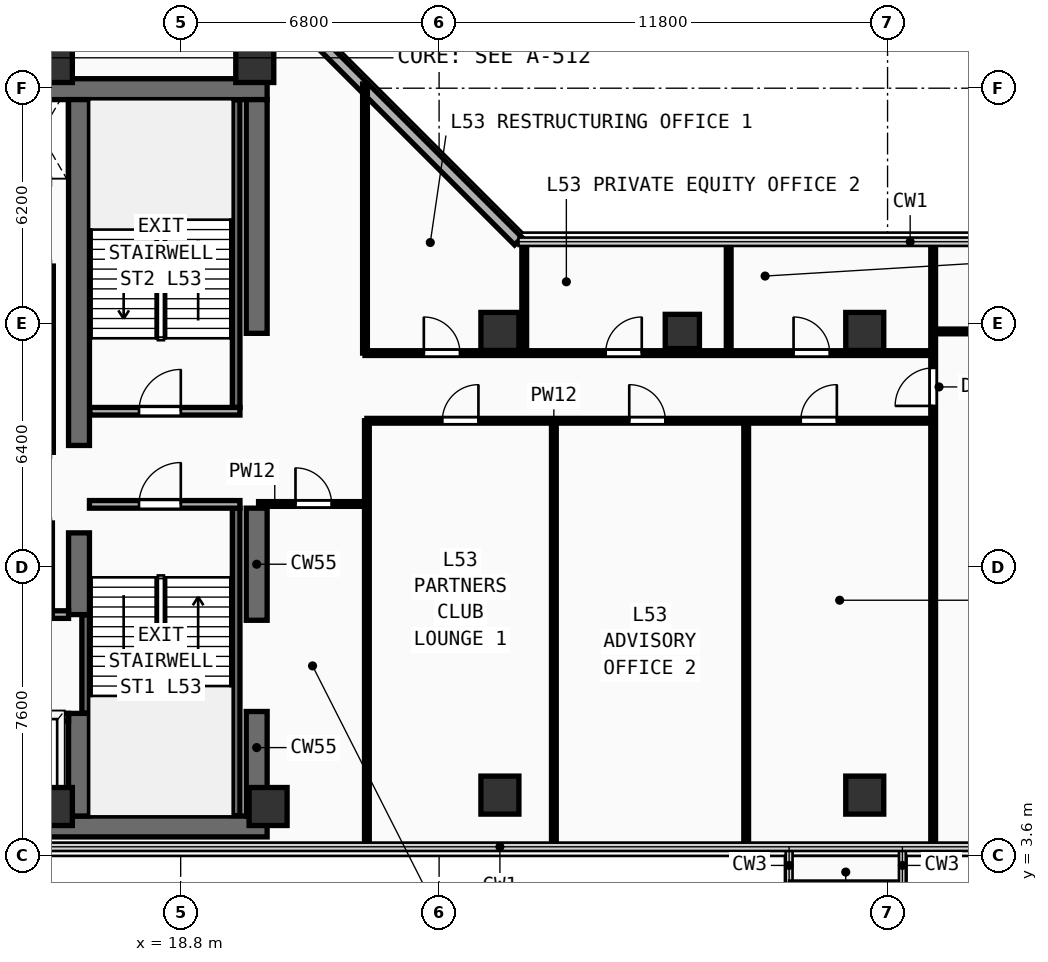
"""IFC4 building model, lengths in metres.
Left out: names, types, materials, properties, quantities, classifications, styles, units other than length and angle.
Written with IfcOpenShell. Run it as: python <this file> out.ifc"""

import sys

from ifc_helpers import new_model, si_unit, direction, frame, frame_2d, origin, origin_2d, place, context, subcontext, project, spatial, rectangle, extrude, element, fill, save


model = new_model("IFC4")
c1 = context("Model", 3, precision=1e-05, world=origin(), true_north=direction((0.0, 1.0)))
c2 = subcontext(c1, "Body", "Model", "MODEL_VIEW")
j1 = project(units=[si_unit("LENGTHUNIT", "METRE"), si_unit("PLANEANGLEUNIT", "RADIAN")], contexts=[c1])
p1 = place(None, origin())
s1 = spatial("IfcSite", under=j1, at=p1, CompositionType="ELEMENT")
p2 = place(p1, origin())
s2 = spatial("IfcBuilding", under=s1, at=p2, CompositionType="ELEMENT")
p3 = place(p2, frame((0.0, 0.0, 208.3)))
s3 = spatial("IfcBuildingStorey", under=s2, at=p3, CompositionType="ELEMENT", Elevation=208.3)
for number, where, z_axis, x_axis in (
    (1, (7.175, 4.375, 0.0), (0.0, 0.0, 1.0), (1.0, 0.0, 0.0)),
    (2, (7.175, 23.775, 0.0), (0.0, 0.0, 1.0), (1.0, 0.0, 0.0)),
):
    element("IfcWall", number, at=place(p3, frame(where, z_axis=z_axis, x_axis=x_axis)), inside=s3, PredefinedType="SHEAR", context=c2, shape_type="SweptSolid", body=[
        extrude(rectangle(XDim=13.9, YDim=0.55, at=frame_2d((6.95, 0.0))), origin(), (0.0, 0.0, 1.0), 3.56),
    ])
p4 = place(p3, frame((20.8, 4.65, 0.0), z_axis=(0.0, 0.0, 1.0), x_axis=(0.0, 1.0, 0.0)))
e3 = element("IfcWall", 3, at=p4, inside=s3, PredefinedType="SHEAR", context=c2, shape_type="SweptSolid", body=[
    extrude(rectangle(XDim=2.75, YDim=0.55, at=frame_2d((1.375, 0.0))), origin(), (0.0, 0.0, 1.0), 3.56),
])
p5 = place(p3, frame((20.8, 9.8, 0.0), z_axis=(0.0, 0.0, 1.0), x_axis=(0.0, 1.0, 0.0)))
e4 = element("IfcWall", 4, at=p5, inside=s3, PredefinedType="SHEAR", context=c2, shape_type="SweptSolid", body=[
    extrude(rectangle(XDim=2.95, YDim=0.55, at=frame_2d((1.475, 0.0))), origin(), (0.0, 0.0, 1.0), 3.56),
])
p6 = place(p3, frame((20.8, 17.35, 0.0), z_axis=(0.0, 0.0, 1.0), x_axis=(0.0, 1.0, 0.0)))
e5 = element("IfcWall", 5, at=p6, inside=s3, PredefinedType="SHEAR", context=c2, shape_type="SweptSolid", body=[
    extrude(rectangle(XDim=6.15, YDim=0.55, at=frame_2d((3.075, 0.0))), origin(), (0.0, 0.0, 1.0), 3.56),
])
p7 = place(p3, frame((16.125, 4.65, 0.0), z_axis=(0.0, 0.0, 1.0), x_axis=(0.0, 1.0, 0.0)))
e6 = element("IfcWall", 6, at=p7, inside=s3, PredefinedType="SHEAR", context=c2, shape_type="SweptSolid", body=[
    extrude(rectangle(XDim=2.7, YDim=0.55, at=frame_2d((1.35, 0.0))), origin(), (0.0, 0.0, 1.0), 3.56),
])
p8 = place(p3, frame((16.125, 9.95, 0.0), z_axis=(0.0, 0.0, 1.0), x_axis=(0.0, 1.0, 0.0)))
e7 = element("IfcWall", 7, at=p8, inside=s3, PredefinedType="SHEAR", context=c2, shape_type="SweptSolid", body=[
    extrude(rectangle(XDim=2.15, YDim=0.55, at=frame_2d((1.075, 0.0))), origin(), (0.0, 0.0, 1.0), 3.56),
])
p9 = place(p3, frame((16.125, 14.4, 0.0), z_axis=(0.0, 0.0, 1.0), x_axis=(0.0, 1.0, 0.0)))
e8 = element("IfcWall", 8, at=p9, inside=s3, PredefinedType="SHEAR", context=c2, shape_type="SweptSolid", body=[
    extrude(rectangle(XDim=9.1, YDim=0.55, at=frame_2d((4.55, 0.0))), origin(), (0.0, 0.0, 1.0), 3.56),
])
for number, where, z_axis, x_axis in (
    (9, (15.45, 4.9, 0.0), (0.0, 0.0, 1.0), (1.0, 0.0, 0.0)),
    (10, (21.1, 4.9, 0.0), (0.0, 0.0, 1.0), (1.0, 0.0, 0.0)),
    (11, (15.45, 24.45, 0.0), (0.0, 0.0, 1.0), (1.0, 0.0, 0.0)),
    (12, (20.75, 24.45, 0.0), (0.0, 0.0, 1.0), (1.0, 0.0, 0.0)),
    (13, (27.2, 5.2, 0.0), (0.0, 0.0, 1.0), (1.0, 0.0, 0.0)),
    (14, (36.8, 5.2, 0.0), (0.0, 0.0, 1.0), (1.0, 0.0, 0.0)),
    (15, (27.2, 17.4, 0.0), (0.0, 0.0, 1.0), (1.0, 0.0, 0.0)),
    (16, (36.8, 17.4, 0.0), (0.0, 0.0, 1.0), (1.0, 0.0, 0.0)),
):
    element("IfcColumn", number, at=place(p3, frame(where, z_axis=z_axis, x_axis=x_axis)), inside=s3, PredefinedType="COLUMN", context=c2, shape_type="SweptSolid", body=[
        extrude(rectangle(XDim=1.0, YDim=1.0, at=origin_2d()), origin(), (0.0, 0.0, 1.0), 3.56),
    ])
p10 = place(p3, frame((32.0, 17.4, 0.0), z_axis=(0.0, 0.0, 1.0), x_axis=(1.0, 0.0, 0.0)))
e17 = element("IfcColumn", 17, at=p10, inside=s3, PredefinedType="COLUMN", context=c2, shape_type="SweptSolid", body=[
    extrude(rectangle(XDim=0.9, YDim=0.9, at=origin_2d()), origin(), (0.0, 0.0, 1.0), 3.56),
])
p11 = place(p3, frame((27.685, 19.775, 0.0), z_axis=(0.0, 0.0, 1.0), x_axis=(-0.707106781187, 0.707106781187, 0.0)))
e18 = element("IfcWall", 18, at=p11, inside=s3, PredefinedType="SOLIDWALL", context=c2, shape_type="SweptSolid", body=[
    extrude(rectangle(XDim=9.207, YDim=0.28, at=frame_2d((4.603, 0.0))), origin(), (0.0, 0.0, 1.0), 3.56),
])
p12 = place(p3, frame((16.3, 7.36, 0.0), z_axis=(0.0, 0.0, 1.0), x_axis=(0.0, 1.0, 0.0)))
e19 = element("IfcWall", 19, at=p12, inside=s3, PredefinedType="SHEAR", context=c2, shape_type="SweptSolid", body=[
    extrude(rectangle(XDim=2.58, YDim=0.2, at=frame_2d((1.29, 0.0))), origin(), (0.0, 0.0, 1.0), 3.56),
])
p13 = place(p3, frame((20.26, 4.66, 0.0), z_axis=(0.0, 0.0, 1.0), x_axis=(0.0, 1.0, 0.0)))
e20 = element("IfcWall", 20, at=p13, inside=s3, PredefinedType="SHEAR", context=c2, shape_type="SweptSolid", body=[
    extrude(rectangle(XDim=8.09, YDim=0.2, at=frame_2d((4.045, 0.0))), origin(), (0.0, 0.0, 1.0), 3.56),
])
p14 = place(p3, frame((16.4, 12.85, 0.0), z_axis=(0.0, 0.0, 1.0), x_axis=(1.0, 0.0, 0.0)))
e21 = element("IfcWall", 21, at=p14, inside=s3, PredefinedType="PARTITIONING", context=c2, shape_type="SweptSolid", body=[
    extrude(rectangle(XDim=3.96, YDim=0.2, at=frame_2d((1.98, 0.0))), origin(), (0.0, 0.0, 1.0), 3.56),
])
p15 = place(p14, frame((1.304, 0.0, 0.0)))
e22 = element("IfcOpeningElement", 22, at=p15, cuts=e21, PredefinedType="OPENING", context=c2, shape_type="SweptSolid", body=[
    extrude(rectangle(XDim=1.1, YDim=2.2, at=frame_2d((0.55, 1.1))), frame((0.0, 0.11, 0.0), z_axis=(0.0, -1.0, 0.0), x_axis=(1.0, 0.0, 0.0)), (0.0, 0.0, 1.0), 0.22),
])
p16 = place(p3, frame((20.26, 15.4, 0.0), z_axis=(0.0, 0.0, 1.0), x_axis=(0.0, 1.0, 0.0)))
e23 = element("IfcWall", 23, at=p16, inside=s3, PredefinedType="SHEAR", context=c2, shape_type="SweptSolid", body=[
    extrude(rectangle(XDim=8.09, YDim=0.2, at=frame_2d((4.045, 0.0))), origin(), (0.0, 0.0, 1.0), 3.56),
])
p17 = place(p3, frame((16.41, 15.3, 0.0), z_axis=(0.0, 0.0, 1.0), x_axis=(1.0, 0.0, 0.0)))
e24 = element("IfcWall", 24, at=p17, inside=s3, PredefinedType="PARTITIONING", context=c2, shape_type="SweptSolid", body=[
    extrude(rectangle(XDim=3.95, YDim=0.2, at=frame_2d((1.975, 0.0))), origin(), (0.0, 0.0, 1.0), 3.56),
])
p18 = place(p17, frame((1.294, 0.0, 0.0)))
e25 = element("IfcOpeningElement", 25, at=p18, cuts=e24, PredefinedType="OPENING", context=c2, shape_type="SweptSolid", body=[
    extrude(rectangle(XDim=1.1, YDim=2.2, at=frame_2d((0.55, 1.1))), frame((0.0, 0.11, 0.0), z_axis=(0.0, -1.0, 0.0), x_axis=(1.0, 0.0, 0.0)), (0.0, 0.0, 1.0), 0.22),
])
p19 = place(p3, frame((7.5, 7.25, 0.0), z_axis=(0.0, 0.0, 1.0), x_axis=(1.0, 0.0, 0.0)))
e26 = element("IfcWall", 26, at=p19, inside=s3, PredefinedType="PARTITIONING", context=c2, shape_type="SweptSolid", body=[
    extrude(rectangle(XDim=8.35, YDim=0.2, at=frame_2d((4.175, 0.0))), origin(), (0.0, 0.0, 1.0), 3.56),
])
p20 = place(p19, frame((0.53, 0.0, 0.0)))
e27 = element("IfcOpeningElement", 27, at=p20, cuts=e26, PredefinedType="OPENING", context=c2, shape_type="SweptSolid", body=[
    extrude(rectangle(XDim=1.1, YDim=2.2, at=frame_2d((0.55, 1.1))), frame((0.0, 0.11, 0.0), z_axis=(0.0, -1.0, 0.0), x_axis=(1.0, 0.0, 0.0)), (0.0, 0.0, 1.0), 0.22),
])
p21 = place(p19, frame((2.37, 0.0, 0.0)))
e28 = element("IfcOpeningElement", 28, at=p21, cuts=e26, PredefinedType="OPENING", context=c2, shape_type="SweptSolid", body=[
    extrude(rectangle(XDim=1.1, YDim=2.2, at=frame_2d((0.55, 1.1))), frame((0.0, 0.11, 0.0), z_axis=(0.0, -1.0, 0.0), x_axis=(1.0, 0.0, 0.0)), (0.0, 0.0, 1.0), 0.22),
])
p22 = place(p19, frame((4.33, 0.0, 0.0)))
e29 = element("IfcOpeningElement", 29, at=p22, cuts=e26, PredefinedType="OPENING", context=c2, shape_type="SweptSolid", body=[
    extrude(rectangle(XDim=1.1, YDim=2.2, at=frame_2d((0.55, 1.1))), frame((0.0, 0.11, 0.0), z_axis=(0.0, -1.0, 0.0), x_axis=(1.0, 0.0, 0.0)), (0.0, 0.0, 1.0), 0.22),
])
p23 = place(p19, frame((6.5, 0.0, 0.0)))
e30 = element("IfcOpeningElement", 30, at=p23, cuts=e26, PredefinedType="OPENING", context=c2, shape_type="SweptSolid", body=[
    extrude(rectangle(XDim=1.1, YDim=2.2, at=frame_2d((0.55, 1.1))), frame((0.0, 0.11, 0.0), z_axis=(0.0, -1.0, 0.0), x_axis=(1.0, 0.0, 0.0)), (0.0, 0.0, 1.0), 0.22),
])
p24 = place(p3, frame((7.5, 9.95, 0.0), z_axis=(0.0, 0.0, 1.0), x_axis=(1.0, 0.0, 0.0)))
e31 = element("IfcWall", 31, at=p24, inside=s3, PredefinedType="PARTITIONING", context=c2, shape_type="SweptSolid", body=[
    extrude(rectangle(XDim=8.35, YDim=0.2, at=frame_2d((4.175, 0.0))), origin(), (0.0, 0.0, 1.0), 3.56),
])
p25 = place(p3, frame((15.35, 9.95, 0.0), z_axis=(0.0, 0.0, 1.0), x_axis=(0.0, 1.0, 0.0)))
e32 = element("IfcWall", 32, at=p25, inside=s3, PredefinedType="PARTITIONING", context=c2, shape_type="SweptSolid", body=[
    extrude(rectangle(XDim=2.41, YDim=0.15, at=frame_2d((1.205, 0.0))), origin(), (0.0, 0.0, 1.0), 3.56),
])
p26 = place(p3, frame((15.35, 14.22, 0.0), z_axis=(0.0, 0.0, 1.0), x_axis=(0.0, 1.0, 0.0)))
e33 = element("IfcWall", 33, at=p26, inside=s3, PredefinedType="PARTITIONING", context=c2, shape_type="SweptSolid", body=[
    extrude(rectangle(XDim=2.23, YDim=0.2, at=frame_2d((1.115, 0.0))), origin(), (0.0, 0.0, 1.0), 3.56),
])
p27 = place(p3, frame((15.35, 16.45, 0.0), z_axis=(0.0, 0.0, 1.0), x_axis=(0.0, 1.0, 0.0)))
e34 = element("IfcWall", 34, at=p27, inside=s3, PredefinedType="PARTITIONING", context=c2, shape_type="SweptSolid", body=[
    extrude(rectangle(XDim=2.67, YDim=0.2, at=frame_2d((1.335, 0.0))), origin(), (0.0, 0.0, 1.0), 3.56),
])
p28 = place(p3, frame((20.85, 12.86, 0.0), z_axis=(0.0, 0.0, 1.0), x_axis=(1.0, 0.0, 0.0)))
e35 = element("IfcWall", 35, at=p28, inside=s3, PredefinedType="PARTITIONING", context=c2, shape_type="SweptSolid", body=[
    extrude(rectangle(XDim=2.85, YDim=0.125, at=frame_2d((1.425, 0.0))), origin(), (0.0, 0.0, 1.0), 3.56),
])
p29 = place(p28, frame((0.971, 0.0, 0.0)))
e36 = element("IfcOpeningElement", 36, at=p29, cuts=e35, PredefinedType="OPENING", context=c2, shape_type="SweptSolid", body=[
    extrude(rectangle(XDim=0.95, YDim=2.15, at=frame_2d((0.475, 1.075))), frame((0.0, 0.073, 0.0), z_axis=(0.0, -1.0, 0.0), x_axis=(1.0, 0.0, 0.0)), (0.0, 0.0, 1.0), 0.145),
])
p30 = place(p3, frame((23.7, 3.84, 0.0), z_axis=(0.0, 0.0, 1.0), x_axis=(0.0, 1.0, 0.0)))
e37 = element("IfcWall", 37, at=p30, inside=s3, PredefinedType="PARTITIONING", context=c2, shape_type="SweptSolid", body=[
    extrude(rectangle(XDim=11.21, YDim=0.125, at=frame_2d((5.605, 0.0))), origin(), (0.0, 0.0, 1.0), 3.56),
])
p31 = place(p3, frame((23.7, 15.05, 0.0), z_axis=(0.0, 0.0, 1.0), x_axis=(1.0, 0.0, 0.0)))
e38 = element("IfcWall", 38, at=p31, inside=s3, PredefinedType="PARTITIONING", context=c2, shape_type="SweptSolid", body=[
    extrude(rectangle(XDim=14.9, YDim=0.125, at=frame_2d((7.45, 0.0))), origin(), (0.0, 0.0, 1.0), 3.56),
])
p32 = place(p31, frame((1.985, 0.0, 0.0)))
e39 = element("IfcOpeningElement", 39, at=p32, cuts=e38, PredefinedType="OPENING", context=c2, shape_type="SweptSolid", body=[
    extrude(rectangle(XDim=0.95, YDim=2.15, at=frame_2d((0.475, 1.075))), frame((0.0, 0.073, 0.0), z_axis=(0.0, -1.0, 0.0), x_axis=(1.0, 0.0, 0.0)), (0.0, 0.0, 1.0), 0.145),
])
p33 = place(p31, frame((6.903, 0.0, 0.0)))
e40 = element("IfcOpeningElement", 40, at=p33, cuts=e38, PredefinedType="OPENING", context=c2, shape_type="SweptSolid", body=[
    extrude(rectangle(XDim=0.95, YDim=2.15, at=frame_2d((0.475, 1.075))), frame((0.0, 0.073, 0.0), z_axis=(0.0, -1.0, 0.0), x_axis=(1.0, 0.0, 0.0)), (0.0, 0.0, 1.0), 0.145),
])
p34 = place(p31, frame((11.416, 0.0, 0.0)))
e41 = element("IfcOpeningElement", 41, at=p34, cuts=e38, PredefinedType="OPENING", context=c2, shape_type="SweptSolid", body=[
    extrude(rectangle(XDim=0.95, YDim=2.15, at=frame_2d((0.475, 1.075))), frame((0.0, 0.073, 0.0), z_axis=(0.0, -1.0, 0.0), x_axis=(1.0, 0.0, 0.0)), (0.0, 0.0, 1.0), 0.145),
])
for number, where, z_axis, x_axis in (
    (42, (28.62, 3.84, 0.0), (0.0, 0.0, 1.0), (0.0, 1.0, 0.0)),
    (43, (33.68, 3.84, 0.0), (0.0, 0.0, 1.0), (0.0, 1.0, 0.0)),
):
    element("IfcWall", number, at=place(p3, frame(where, z_axis=z_axis, x_axis=x_axis)), inside=s3, PredefinedType="PARTITIONING", context=c2, shape_type="SweptSolid", body=[
        extrude(rectangle(XDim=11.21, YDim=0.125, at=frame_2d((5.605, 0.0))), origin(), (0.0, 0.0, 1.0), 3.56),
    ])
p35 = place(p3, frame((38.6, 3.84, 0.0), z_axis=(0.0, 0.0, 1.0), x_axis=(0.0, 1.0, 0.0)))
e44 = element("IfcWall", 44, at=p35, inside=s3, PredefinedType="PARTITIONING", context=c2, shape_type="SweptSolid", body=[
    extrude(rectangle(XDim=15.92, YDim=0.125, at=frame_2d((7.96, 0.0))), origin(), (0.0, 0.0, 1.0), 3.56),
])
p36 = place(p35, frame((11.6, 0.0, 0.0)))
e45 = element("IfcOpeningElement", 45, at=p36, cuts=e44, PredefinedType="OPENING", context=c2, shape_type="SweptSolid", body=[
    extrude(rectangle(XDim=1.0, YDim=2.2, at=frame_2d((0.5, 1.1))), frame((0.0, 0.073, 0.0), z_axis=(0.0, -1.0, 0.0), x_axis=(1.0, 0.0, 0.0)), (0.0, 0.0, 1.0), 0.145),
])
p37 = place(p3, frame((38.6, 17.4, 0.0), z_axis=(0.0, 0.0, 1.0), x_axis=(1.0, 0.0, 0.0)))
e46 = element("IfcWall", 46, at=p37, inside=s3, PredefinedType="PARTITIONING", context=c2, shape_type="SweptSolid", body=[
    extrude(rectangle(XDim=12.56, YDim=0.125, at=frame_2d((6.28, 0.0))), origin(), (0.0, 0.0, 1.0), 3.26),
])
p38 = place(p37, frame((3.525, 0.0, 0.0)))
e47 = element("IfcOpeningElement", 47, at=p38, cuts=e46, PredefinedType="OPENING", context=c2, shape_type="SweptSolid", body=[
    extrude(rectangle(XDim=0.95, YDim=2.15, at=frame_2d((0.475, 1.075))), frame((0.0, 0.073, 0.0), z_axis=(0.0, -1.0, 0.0), x_axis=(1.0, 0.0, 0.0)), (0.0, 0.0, 1.0), 0.145),
])
p39 = place(p3, frame((23.65, 16.83, 0.0), z_axis=(0.0, 0.0, 1.0), x_axis=(0.0, 1.0, 0.0)))
e48 = element("IfcWall", 48, at=p39, inside=s3, PredefinedType="PARTITIONING", context=c2, shape_type="SweptSolid", body=[
    extrude(rectangle(XDim=7.08, YDim=0.125, at=frame_2d((3.54, 0.0))), origin(), (0.0, 0.0, 1.0), 3.56),
])
p40 = place(p3, frame((23.65, 16.83, 0.0), z_axis=(0.0, 0.0, 1.0), x_axis=(1.0, 0.0, 0.0)))
e49 = element("IfcWall", 49, at=p40, inside=s3, PredefinedType="PARTITIONING", context=c2, shape_type="SweptSolid", body=[
    extrude(rectangle(XDim=14.95, YDim=0.125, at=frame_2d((7.475, 0.0))), origin(), (0.0, 0.0, 1.0), 3.56),
])
p41 = place(p40, frame((1.548, 0.0, 0.0)))
e50 = element("IfcOpeningElement", 50, at=p41, cuts=e49, PredefinedType="OPENING", context=c2, shape_type="SweptSolid", body=[
    extrude(rectangle(XDim=0.95, YDim=2.15, at=frame_2d((0.475, 1.075))), frame((0.0, 0.073, 0.0), z_axis=(0.0, -1.0, 0.0), x_axis=(1.0, 0.0, 0.0)), (0.0, 0.0, 1.0), 0.145),
])
p42 = place(p40, frame((6.333, 0.0, 0.0)))
e51 = element("IfcOpeningElement", 51, at=p42, cuts=e49, PredefinedType="OPENING", context=c2, shape_type="SweptSolid", body=[
    extrude(rectangle(XDim=0.95, YDim=2.15, at=frame_2d((0.475, 1.075))), frame((0.0, 0.073, 0.0), z_axis=(0.0, -1.0, 0.0), x_axis=(1.0, 0.0, 0.0)), (0.0, 0.0, 1.0), 0.145),
])
p43 = place(p40, frame((11.277, 0.0, 0.0)))
e52 = element("IfcOpeningElement", 52, at=p43, cuts=e49, PredefinedType="OPENING", context=c2, shape_type="SweptSolid", body=[
    extrude(rectangle(XDim=0.95, YDim=2.15, at=frame_2d((0.475, 1.075))), frame((0.0, 0.073, 0.0), z_axis=(0.0, -1.0, 0.0), x_axis=(1.0, 0.0, 0.0)), (0.0, 0.0, 1.0), 0.145),
])
for number, where, z_axis, x_axis in (
    (53, (27.84, 16.83, 0.0), (0.0, 0.0, 1.0), (0.0, 1.0, 0.0)),
    (54, (33.22, 16.83, 0.0), (0.0, 0.0, 1.0), (0.0, 1.0, 0.0)),
):
    element("IfcWall", number, at=place(p3, frame(where, z_axis=z_axis, x_axis=x_axis)), inside=s3, PredefinedType="PARTITIONING", context=c2, shape_type="SweptSolid", body=[
        extrude(rectangle(XDim=2.93, YDim=0.125, at=frame_2d((1.465, 0.0))), origin(), (0.0, 0.0, 1.0), 3.56),
    ])
p44 = place(p15, frame((1.1, 0.0, 0.0), z_axis=(0.0, 0.0, 1.0), x_axis=(-1.0, 0.0, 0.0)))
e55 = element("IfcDoor", 55, at=p44, inside=s3, OperationType="SINGLE_SWING_LEFT", PredefinedType="DOOR", context=c2, shape_type="SweptSolid", body=[
    extrude(rectangle(XDim=1.1, YDim=2.2, at=frame_2d((0.55, 1.1))), frame((0.0, 0.025, 0.0), z_axis=(0.0, -1.0, 0.0), x_axis=(1.0, 0.0, 0.0)), (0.0, 0.0, 1.0), 0.05),
])
fill(e22, e55)
p45 = place(p18, origin())
e56 = element("IfcDoor", 56, at=p45, inside=s3, OperationType="SINGLE_SWING_RIGHT", PredefinedType="DOOR", context=c2, shape_type="SweptSolid", body=[
    extrude(rectangle(XDim=1.1, YDim=2.2, at=frame_2d((0.55, 1.1))), frame((0.0, 0.025, 0.0), z_axis=(0.0, -1.0, 0.0), x_axis=(1.0, 0.0, 0.0)), (0.0, 0.0, 1.0), 0.05),
])
fill(e25, e56)
p46 = place(p29, origin())
e57 = element("IfcDoor", 57, at=p46, inside=s3, OperationType="SINGLE_SWING_LEFT", PredefinedType="DOOR", context=c2, shape_type="SweptSolid", body=[
    extrude(rectangle(XDim=0.95, YDim=2.15, at=frame_2d((0.475, 1.075))), frame((0.0, 0.025, 0.0), z_axis=(0.0, -1.0, 0.0), x_axis=(1.0, 0.0, 0.0)), (0.0, 0.0, 1.0), 0.05),
])
fill(e36, e57)
p47 = place(p32, origin())
e58 = element("IfcDoor", 58, at=p47, inside=s3, OperationType="SINGLE_SWING_RIGHT", PredefinedType="DOOR", context=c2, shape_type="SweptSolid", body=[
    extrude(rectangle(XDim=0.95, YDim=2.15, at=frame_2d((0.475, 1.075))), frame((0.0, 0.025, 0.0), z_axis=(0.0, -1.0, 0.0), x_axis=(1.0, 0.0, 0.0)), (0.0, 0.0, 1.0), 0.05),
])
fill(e39, e58)
p48 = place(p33, origin())
e59 = element("IfcDoor", 59, at=p48, inside=s3, OperationType="SINGLE_SWING_LEFT", PredefinedType="DOOR", context=c2, shape_type="SweptSolid", body=[
    extrude(rectangle(XDim=0.95, YDim=2.15, at=frame_2d((0.475, 1.075))), frame((0.0, 0.025, 0.0), z_axis=(0.0, -1.0, 0.0), x_axis=(1.0, 0.0, 0.0)), (0.0, 0.0, 1.0), 0.05),
])
fill(e40, e59)
p49 = place(p34, origin())
e60 = element("IfcDoor", 60, at=p49, inside=s3, OperationType="SINGLE_SWING_RIGHT", PredefinedType="DOOR", context=c2, shape_type="SweptSolid", body=[
    extrude(rectangle(XDim=0.95, YDim=2.15, at=frame_2d((0.475, 1.075))), frame((0.0, 0.025, 0.0), z_axis=(0.0, -1.0, 0.0), x_axis=(1.0, 0.0, 0.0)), (0.0, 0.0, 1.0), 0.05),
])
fill(e41, e60)
p50 = place(p36, origin())
e61 = element("IfcDoor", 61, at=p50, inside=s3, OperationType="SINGLE_SWING_LEFT", PredefinedType="DOOR", context=c2, shape_type="SweptSolid", body=[
    extrude(rectangle(XDim=1.0, YDim=2.2, at=frame_2d((0.5, 1.1))), frame((0.0, 0.025, 0.0), z_axis=(0.0, -1.0, 0.0), x_axis=(1.0, 0.0, 0.0)), (0.0, 0.0, 1.0), 0.05),
])
fill(e45, e61)
p51 = place(p41, origin())
e62 = element("IfcDoor", 62, at=p51, inside=s3, OperationType="SINGLE_SWING_LEFT", PredefinedType="DOOR", context=c2, shape_type="SweptSolid", body=[
    extrude(rectangle(XDim=0.95, YDim=2.15, at=frame_2d((0.475, 1.075))), frame((0.0, 0.025, 0.0), z_axis=(0.0, -1.0, 0.0), x_axis=(1.0, 0.0, 0.0)), (0.0, 0.0, 1.0), 0.05),
])
fill(e50, e62)
p52 = place(p42, origin())
e63 = element("IfcDoor", 63, at=p52, inside=s3, OperationType="SINGLE_SWING_RIGHT", PredefinedType="DOOR", context=c2, shape_type="SweptSolid", body=[
    extrude(rectangle(XDim=0.95, YDim=2.15, at=frame_2d((0.475, 1.075))), frame((0.0, 0.025, 0.0), z_axis=(0.0, -1.0, 0.0), x_axis=(1.0, 0.0, 0.0)), (0.0, 0.0, 1.0), 0.05),
])
fill(e51, e63)
p53 = place(p43, origin())
e64 = element("IfcDoor", 64, at=p53, inside=s3, OperationType="SINGLE_SWING_LEFT", PredefinedType="DOOR", context=c2, shape_type="SweptSolid", body=[
    extrude(rectangle(XDim=0.95, YDim=2.15, at=frame_2d((0.475, 1.075))), frame((0.0, 0.025, 0.0), z_axis=(0.0, -1.0, 0.0), x_axis=(1.0, 0.0, 0.0)), (0.0, 0.0, 1.0), 0.05),
])
fill(e52, e64)
save(model, sys.argv[1])
